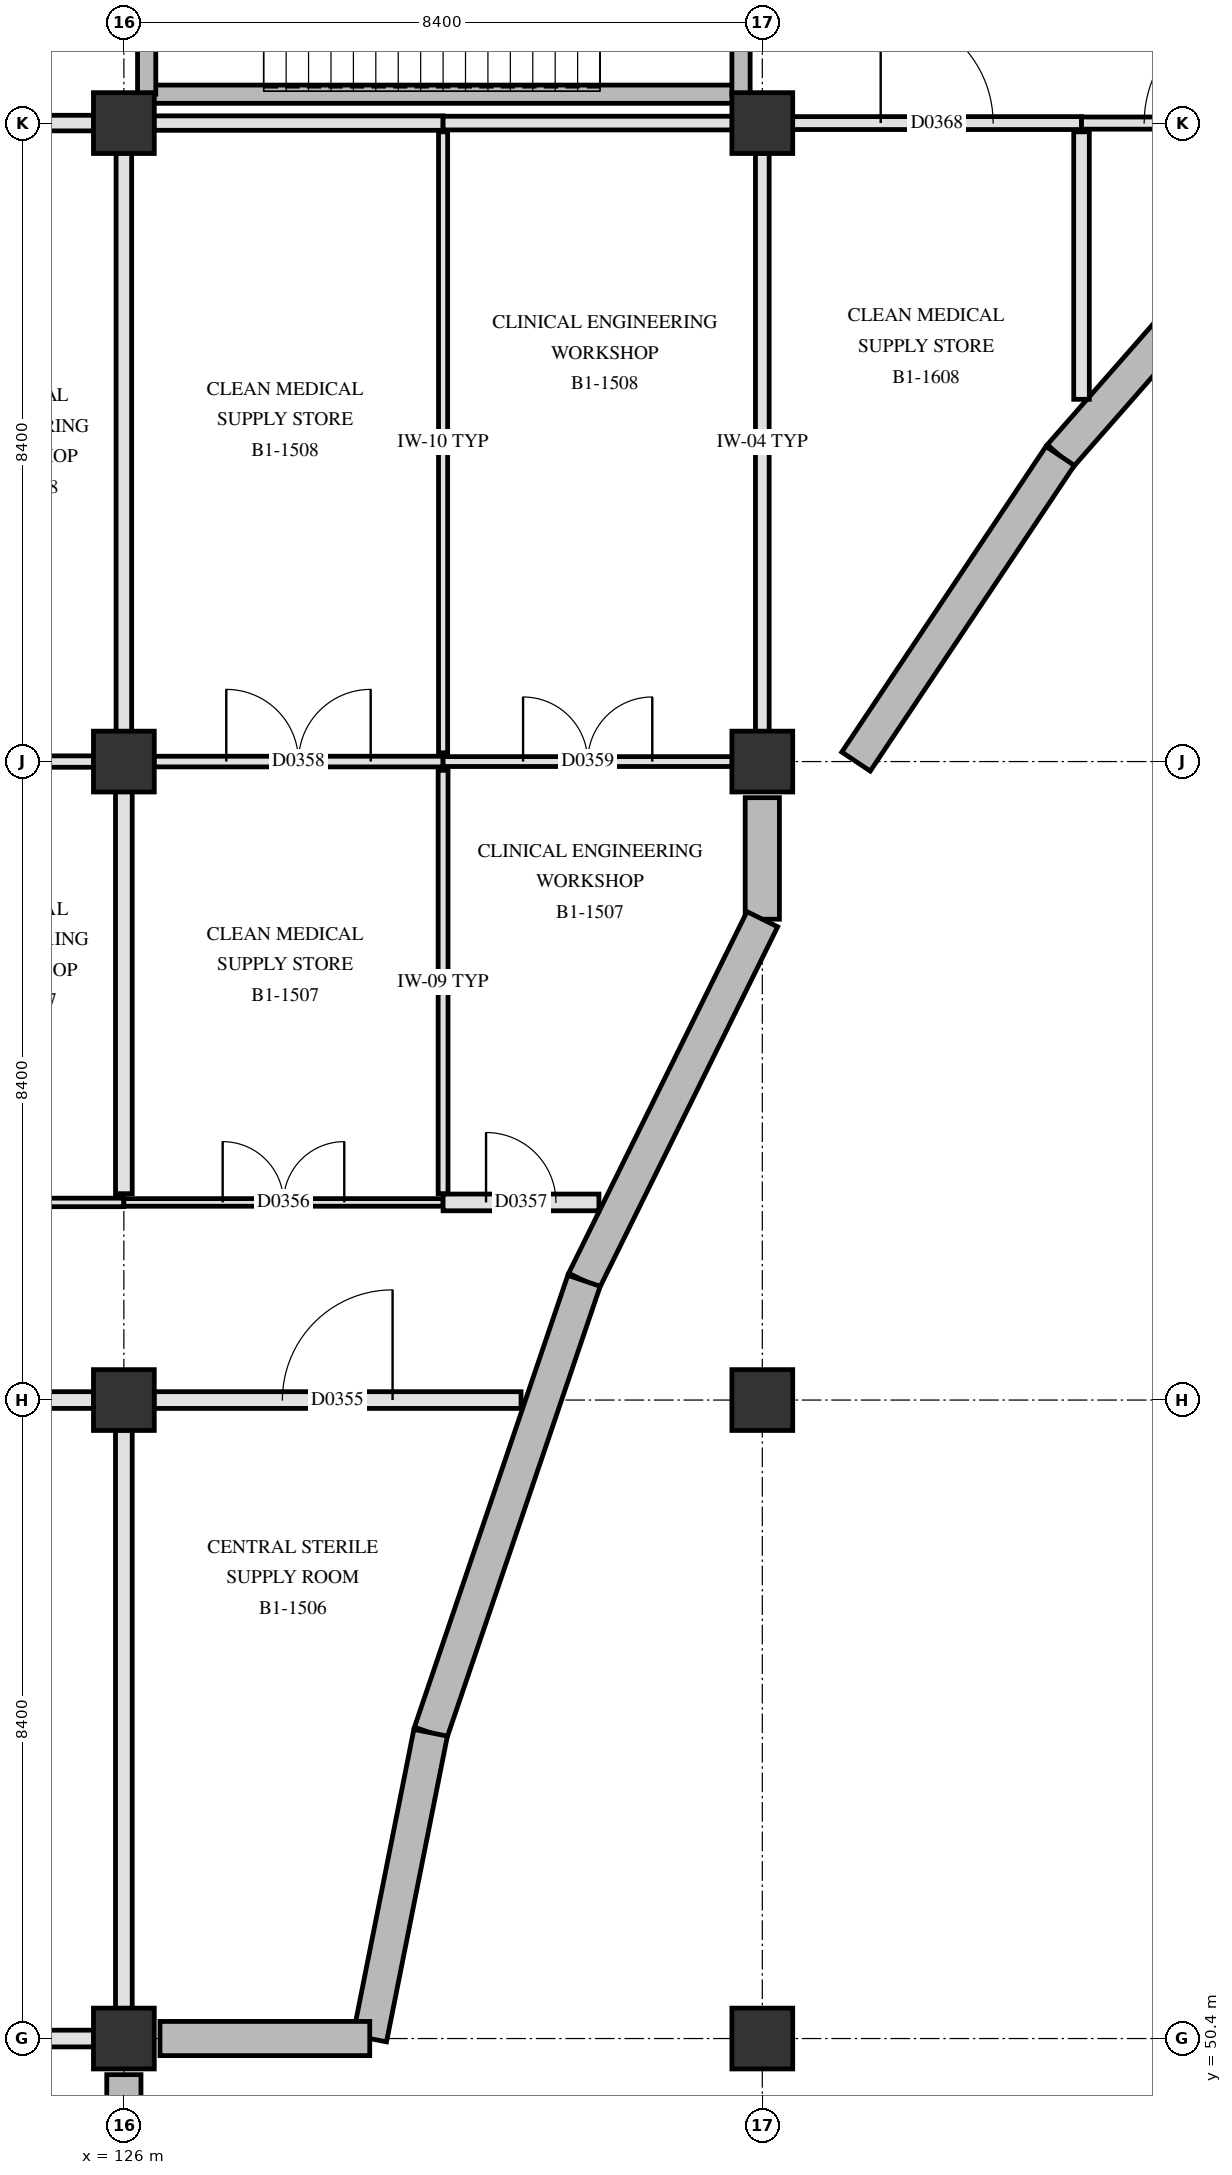
"""IFC4 building model, lengths in metres.
Left out: names, types, materials, properties, quantities, classifications, styles, units other than length and angle.
Written with IfcOpenShell. Run it as: python <this file> out.ifc"""

import sys

from ifc_helpers import new_model, si_unit, direction, frame, frame_2d, origin, origin_2d, place, context, subcontext, project, spatial, rectangle, extrude, element, fill, save


model = new_model("IFC4")
c1 = context("Model", 3, precision=1e-05, world=origin(), true_north=direction((0.0, 1.0)))
c2 = subcontext(c1, "Body", "Model", "MODEL_VIEW")
j1 = project(units=[si_unit("LENGTHUNIT", "METRE"), si_unit("PLANEANGLEUNIT", "RADIAN")], contexts=[c1])
p1 = place(None, origin())
s1 = spatial("IfcSite", under=j1, at=p1, CompositionType="ELEMENT")
p2 = place(p1, origin())
s2 = spatial("IfcBuilding", under=s1, at=p2, CompositionType="ELEMENT")
p3 = place(p2, frame((0.0, 0.0, -5.4)))
s3 = spatial("IfcBuildingStorey", under=s2, at=p3, CompositionType="ELEMENT", Elevation=-5.4)
for number, where, z_axis, x_axis in (
    (1, (126.0, 50.4, 0.0), (0.0, 0.0, 1.0), (1.0, 0.0, 0.0)),
    (2, (126.0, 58.8, 0.0), (0.0, 0.0, 1.0), (1.0, 0.0, 0.0)),
    (3, (126.0, 67.2, 0.0), (0.0, 0.0, 1.0), (1.0, 0.0, 0.0)),
    (4, (126.0, 75.6, 0.0), (0.0, 0.0, 1.0), (1.0, 0.0, 0.0)),
    (5, (134.4, 50.4, 0.0), (0.0, 0.0, 1.0), (1.0, 0.0, 0.0)),
    (6, (134.4, 58.8, 0.0), (0.0, 0.0, 1.0), (1.0, 0.0, 0.0)),
    (7, (134.4, 67.2, 0.0), (0.0, 0.0, 1.0), (1.0, 0.0, 0.0)),
    (8, (134.4, 75.6, 0.0), (0.0, 0.0, 1.0), (1.0, 0.0, 0.0)),
):
    element("IfcColumn", number, at=place(p3, frame(where, z_axis=z_axis, x_axis=x_axis)), inside=s3, PredefinedType="COLUMN", context=c2, shape_type="SweptSolid", body=[
        extrude(rectangle(XDim=0.8, YDim=0.8, at=origin_2d()), origin(), (0.0, 0.0, 1.0), 5.4),
    ])
p4 = place(p3, frame((142.325, 75.788, 0.0), z_axis=(0.0, 0.0, 1.0), x_axis=(-0.659400362996, -0.751791966758, 0.0)))
e9 = element("IfcWall", 9, at=p4, inside=s3, PredefinedType="SOLIDWALL", context=c2, shape_type="SweptSolid", body=[
    extrude(rectangle(XDim=6.075, YDim=0.45, at=frame_2d((3.038, 0.0))), origin(), (0.0, 0.0, 1.0), 5.08),
])
p5 = place(p3, frame((138.319, 71.221, 0.0), z_axis=(0.0, 0.0, 1.0), x_axis=(-0.555468930348, -0.831537291658, 0.0)))
e10 = element("IfcWall", 10, at=p5, inside=s3, PredefinedType="SOLIDWALL", context=c2, shape_type="SweptSolid", body=[
    extrude(rectangle(XDim=4.836, YDim=0.45, at=frame_2d((2.418, 0.0))), origin(), (0.0, 0.0, 1.0), 5.08),
])
p6 = place(p3, frame((134.4, 66.725, 0.0), z_axis=(0.0, 0.0, 1.0), x_axis=(0.0, -1.0, 0.0)))
e11 = element("IfcWall", 11, at=p6, inside=s3, PredefinedType="SOLIDWALL", context=c2, shape_type="SweptSolid", body=[
    extrude(rectangle(XDim=1.599, YDim=0.45, at=frame_2d((0.8, 0.0))), origin(), (0.0, 0.0, 1.0), 5.08),
])
p7 = place(p3, frame((134.4, 65.126, 0.0), z_axis=(0.0, 0.0, 1.0), x_axis=(-0.442290962563, -0.896871620933, 0.0)))
e12 = element("IfcWall", 12, at=p7, inside=s3, PredefinedType="SOLIDWALL", context=c2, shape_type="SweptSolid", body=[
    extrude(rectangle(XDim=5.304, YDim=0.45, at=frame_2d((2.652, 0.0))), origin(), (0.0, 0.0, 1.0), 5.08),
])
p8 = place(p3, frame((132.054, 60.369, 0.0), z_axis=(0.0, 0.0, 1.0), x_axis=(-0.321402193691, -0.946942780685, 0.0)))
e13 = element("IfcWall", 13, at=p8, inside=s3, PredefinedType="SOLIDWALL", context=c2, shape_type="SweptSolid", body=[
    extrude(rectangle(XDim=6.279, YDim=0.45, at=frame_2d((3.14, 0.0))), origin(), (0.0, 0.0, 1.0), 5.08),
])
p9 = place(p3, frame((130.036, 54.423, 0.0), z_axis=(0.0, 0.0, 1.0), x_axis=(-0.195211869209, -0.980761095334, 0.0)))
e14 = element("IfcWall", 14, at=p9, inside=s3, PredefinedType="SOLIDWALL", context=c2, shape_type="SweptSolid", body=[
    extrude(rectangle(XDim=4.102, YDim=0.45, at=frame_2d((2.051, 0.0))), origin(), (0.0, 0.0, 1.0), 5.08),
])
p10 = place(p3, frame((129.235, 50.4, 0.0), z_axis=(0.0, 0.0, 1.0), x_axis=(-1.0, 0.0, 0.0)))
e15 = element("IfcWall", 15, at=p10, inside=s3, PredefinedType="SOLIDWALL", context=c2, shape_type="SweptSolid", body=[
    extrude(rectangle(XDim=2.76, YDim=0.45, at=frame_2d((1.38, 0.0))), origin(), (0.0, 0.0, 1.0), 5.08),
])
p11 = place(p3, frame((126.0, 49.925, 0.0), z_axis=(0.0, 0.0, 1.0), x_axis=(0.0, -1.0, 0.0)))
e16 = element("IfcWall", 16, at=p11, inside=s3, PredefinedType="SOLIDWALL", context=c2, shape_type="SweptSolid", body=[
    extrude(rectangle(XDim=7.45, YDim=0.45, at=frame_2d((3.725, 0.0))), origin(), (0.0, 0.0, 1.0), 5.08),
])
p12 = place(p3, frame((126.3, 75.98, 0.0), z_axis=(0.0, 0.0, 1.0), x_axis=(1.0, 0.0, 0.0)))
e17 = element("IfcWall", 17, at=p12, inside=s3, PredefinedType="SHEAR", context=c2, shape_type="SweptSolid", body=[
    extrude(rectangle(XDim=7.82, YDim=0.24, at=frame_2d((3.91, 0.0))), origin(), (0.0, 0.0, 1.0), 5.08),
])
for number, where, z_axis, x_axis in (
    (18, (126.3, 75.98, 0.0), (0.0, 0.0, 1.0), (0.0, 1.0, 0.0)),
    (19, (134.12, 75.98, 0.0), (0.0, 0.0, 1.0), (0.0, 1.0, 0.0)),
):
    element("IfcWall", number, at=place(p3, frame(where, z_axis=z_axis, x_axis=x_axis)), inside=s3, PredefinedType="SHEAR", context=c2, shape_type="SweptSolid", body=[
        extrude(rectangle(XDim=3.32, YDim=0.24, at=frame_2d((1.66, 0.0))), origin(), (0.0, 0.0, 1.0), 5.08),
    ])
p13 = place(p3, frame((118.045, 50.4, 0.0), z_axis=(0.0, 0.0, 1.0), x_axis=(1.0, 0.0, 0.0)))
e20 = element("IfcWall", 20, at=p13, inside=s3, PredefinedType="PARTITIONING", context=c2, shape_type="SweptSolid", body=[
    extrude(rectangle(XDim=7.56, YDim=0.22, at=frame_2d((3.78, 0.0))), origin(), (0.0, 0.0, 1.0), 4.42),
])
p14 = place(p3, frame((118.045, 58.8, 0.0), z_axis=(0.0, 0.0, 1.0), x_axis=(1.0, 0.0, 0.0)))
e21 = element("IfcWall", 21, at=p14, inside=s3, PredefinedType="PARTITIONING", context=c2, shape_type="SweptSolid", body=[
    extrude(rectangle(XDim=7.56, YDim=0.22, at=frame_2d((3.78, 0.0))), origin(), (0.0, 0.0, 1.0), 4.42),
])
p15 = place(p14, frame((2.86, 0.0, 0.0)))
e22 = element("IfcOpeningElement", 22, at=p15, cuts=e21, PredefinedType="OPENING", context=c2, shape_type="SweptSolid", body=[
    extrude(rectangle(XDim=1.84, YDim=2.28, at=frame_2d((0.92, 1.14))), frame((0.0, 0.12, 0.0), z_axis=(0.0, -1.0, 0.0), x_axis=(1.0, 0.0, 0.0)), (0.0, 0.0, 1.0), 0.24),
])
p16 = place(p3, frame((126.395, 58.8, 0.0), z_axis=(0.0, 0.0, 1.0), x_axis=(1.0, 0.0, 0.0)))
e23 = element("IfcWall", 23, at=p16, inside=s3, PredefinedType="PARTITIONING", context=c2, shape_type="SweptSolid", body=[
    extrude(rectangle(XDim=4.831, YDim=0.22, at=frame_2d((2.416, 0.0))), origin(), (0.0, 0.0, 1.0), 4.42),
])
p17 = place(p16, frame((1.69, 0.0, 0.0)))
e24 = element("IfcOpeningElement", 24, at=p17, cuts=e23, PredefinedType="OPENING", context=c2, shape_type="SweptSolid", body=[
    extrude(rectangle(XDim=1.45, YDim=2.2, at=frame_2d((0.725, 1.1))), frame((0.0, 0.12, 0.0), z_axis=(0.0, -1.0, 0.0), x_axis=(1.0, 0.0, 0.0)), (0.0, 0.0, 1.0), 0.24),
])
p18 = place(p3, frame((121.8, 61.4, 0.0), z_axis=(0.0, 0.0, 1.0), x_axis=(1.0, 0.0, 0.0)))
e25 = element("IfcWall", 25, at=p18, inside=s3, PredefinedType="PARTITIONING", context=c2, shape_type="SweptSolid", body=[
    extrude(rectangle(XDim=4.2, YDim=0.112, at=frame_2d((2.1, 0.0))), origin(), (0.0, 0.0, 1.0), 4.47),
])
p19 = place(p18, frame((1.56, 0.0, 0.0)))
e26 = element("IfcOpeningElement", 26, at=p19, cuts=e25, PredefinedType="OPENING", context=c2, shape_type="SweptSolid", body=[
    extrude(rectangle(XDim=1.08, YDim=2.12, at=frame_2d((0.54, 1.06))), frame((0.0, 0.066, 0.0), z_axis=(0.0, -1.0, 0.0), x_axis=(1.0, 0.0, 0.0)), (0.0, 0.0, 1.0), 0.132),
])
p20 = place(p3, frame((126.0, 61.4, 0.0), z_axis=(0.0, 0.0, 1.0), x_axis=(1.0, 0.0, 0.0)))
e27 = element("IfcWall", 27, at=p20, inside=s3, PredefinedType="PARTITIONING", context=c2, shape_type="SweptSolid", body=[
    extrude(rectangle(XDim=4.2, YDim=0.1, at=frame_2d((2.1, 0.0))), origin(), (0.0, 0.0, 1.0), 4.47),
])
p21 = place(p20, frame((1.3, 0.0, 0.0)))
e28 = element("IfcOpeningElement", 28, at=p21, cuts=e27, PredefinedType="OPENING", context=c2, shape_type="SweptSolid", body=[
    extrude(rectangle(XDim=1.6, YDim=2.25, at=frame_2d((0.8, 1.125))), frame((0.0, 0.06, 0.0), z_axis=(0.0, -1.0, 0.0), x_axis=(1.0, 0.0, 0.0)), (0.0, 0.0, 1.0), 0.12),
])
p22 = place(p3, frame((130.2, 61.4, 0.0), z_axis=(0.0, 0.0, 1.0), x_axis=(1.0, 0.0, 0.0)))
e29 = element("IfcWall", 29, at=p22, inside=s3, PredefinedType="PARTITIONING", context=c2, shape_type="SweptSolid", body=[
    extrude(rectangle(XDim=2.05, YDim=0.22, at=frame_2d((1.025, 0.0))), origin(), (0.0, 0.0, 1.0), 5.07),
])
p23 = place(p22, frame((0.565, 0.0, 0.0)))
e30 = element("IfcOpeningElement", 30, at=p23, cuts=e29, PredefinedType="OPENING", context=c2, shape_type="SweptSolid", body=[
    extrude(rectangle(XDim=0.92, YDim=2.08, at=frame_2d((0.46, 1.04))), frame((0.0, 0.12, 0.0), z_axis=(0.0, -1.0, 0.0), x_axis=(1.0, 0.0, 0.0)), (0.0, 0.0, 1.0), 0.24),
])
p24 = place(p3, frame((121.8, 67.2, 0.0), z_axis=(0.0, 0.0, 1.0), x_axis=(1.0, 0.0, 0.0)))
e31 = element("IfcWall", 31, at=p24, inside=s3, PredefinedType="PARTITIONING", context=c2, shape_type="SweptSolid", body=[
    extrude(rectangle(XDim=3.805, YDim=0.15, at=frame_2d((1.902, 0.0))), origin(), (0.0, 0.0, 1.0), 4.42),
])
p25 = place(p3, frame((126.395, 67.2, 0.0), z_axis=(0.0, 0.0, 1.0), x_axis=(1.0, 0.0, 0.0)))
e32 = element("IfcWall", 32, at=p25, inside=s3, PredefinedType="PARTITIONING", context=c2, shape_type="SweptSolid", body=[
    extrude(rectangle(XDim=3.805, YDim=0.14, at=frame_2d((1.902, 0.0))), origin(), (0.0, 0.0, 1.0), 4.42),
])
p26 = place(p25, frame((0.952, 0.0, 0.0)))
e33 = element("IfcOpeningElement", 33, at=p26, cuts=e32, PredefinedType="OPENING", context=c2, shape_type="SweptSolid", body=[
    extrude(rectangle(XDim=1.9, YDim=2.3, at=frame_2d((0.95, 1.15))), frame((0.0, 0.08, 0.0), z_axis=(0.0, -1.0, 0.0), x_axis=(1.0, 0.0, 0.0)), (0.0, 0.0, 1.0), 0.16),
])
p27 = place(p3, frame((130.2, 67.2, 0.0), z_axis=(0.0, 0.0, 1.0), x_axis=(1.0, 0.0, 0.0)))
e34 = element("IfcWall", 34, at=p27, inside=s3, PredefinedType="PARTITIONING", context=c2, shape_type="SweptSolid", body=[
    extrude(rectangle(XDim=3.805, YDim=0.13, at=frame_2d((1.902, 0.0))), origin(), (0.0, 0.0, 1.0), 4.42),
])
p28 = place(p27, frame((1.052, 0.0, 0.0)))
e35 = element("IfcOpeningElement", 35, at=p28, cuts=e34, PredefinedType="OPENING", context=c2, shape_type="SweptSolid", body=[
    extrude(rectangle(XDim=1.7, YDim=2.25, at=frame_2d((0.85, 1.125))), frame((0.0, 0.075, 0.0), z_axis=(0.0, -1.0, 0.0), x_axis=(1.0, 0.0, 0.0)), (0.0, 0.0, 1.0), 0.15),
])
p29 = place(p3, frame((121.8, 75.6, 0.0), z_axis=(0.0, 0.0, 1.0), x_axis=(1.0, 0.0, 0.0)))
e36 = element("IfcWall", 36, at=p29, inside=s3, PredefinedType="PARTITIONING", context=c2, shape_type="SweptSolid", body=[
    extrude(rectangle(XDim=3.805, YDim=0.205, at=frame_2d((1.902, 0.0))), origin(), (0.0, 0.0, 1.0), 4.42),
])
p30 = place(p29, frame((1.242, 0.0, 0.0)))
e37 = element("IfcOpeningElement", 37, at=p30, cuts=e36, PredefinedType="OPENING", context=c2, shape_type="SweptSolid", body=[
    extrude(rectangle(XDim=1.32, YDim=2.18, at=frame_2d((0.66, 1.09))), frame((0.0, 0.113, 0.0), z_axis=(0.0, -1.0, 0.0), x_axis=(1.0, 0.0, 0.0)), (0.0, 0.0, 1.0), 0.225),
])
p31 = place(p3, frame((126.395, 75.6, 0.0), z_axis=(0.0, 0.0, 1.0), x_axis=(1.0, 0.0, 0.0)))
e38 = element("IfcWall", 38, at=p31, inside=s3, PredefinedType="PARTITIONING", context=c2, shape_type="SweptSolid", body=[
    extrude(rectangle(XDim=3.805, YDim=0.19, at=frame_2d((1.902, 0.0))), origin(), (0.0, 0.0, 1.0), 4.42),
])
p32 = place(p3, frame((130.2, 75.6, 0.0), z_axis=(0.0, 0.0, 1.0), x_axis=(1.0, 0.0, 0.0)))
e39 = element("IfcWall", 39, at=p32, inside=s3, PredefinedType="PARTITIONING", context=c2, shape_type="SweptSolid", body=[
    extrude(rectangle(XDim=3.805, YDim=0.18, at=frame_2d((1.902, 0.0))), origin(), (0.0, 0.0, 1.0), 4.42),
])
p33 = place(p3, frame((134.795, 75.6, 0.0), z_axis=(0.0, 0.0, 1.0), x_axis=(1.0, 0.0, 0.0)))
e40 = element("IfcWall", 40, at=p33, inside=s3, PredefinedType="PARTITIONING", context=c2, shape_type="SweptSolid", body=[
    extrude(rectangle(XDim=3.805, YDim=0.17, at=frame_2d((1.903, 0.0))), origin(), (0.0, 0.0, 1.0), 4.42),
])
p34 = place(p33, frame((1.163, 0.0, 0.0)))
e41 = element("IfcOpeningElement", 41, at=p34, cuts=e40, PredefinedType="OPENING", context=c2, shape_type="SweptSolid", body=[
    extrude(rectangle(XDim=1.48, YDim=2.22, at=frame_2d((0.74, 1.11))), frame((0.0, 0.095, 0.0), z_axis=(0.0, -1.0, 0.0), x_axis=(1.0, 0.0, 0.0)), (0.0, 0.0, 1.0), 0.19),
])
p35 = place(p3, frame((138.6, 75.6, 0.0), z_axis=(0.0, 0.0, 1.0), x_axis=(1.0, 0.0, 0.0)))
e42 = element("IfcWall", 42, at=p35, inside=s3, PredefinedType="PARTITIONING", context=c2, shape_type="SweptSolid", body=[
    extrude(rectangle(XDim=3.188, YDim=0.16, at=frame_2d((1.594, 0.0))), origin(), (0.0, 0.0, 1.0), 4.42),
])
p36 = place(p35, frame((0.824, 0.0, 0.0)))
e43 = element("IfcOpeningElement", 43, at=p36, cuts=e42, PredefinedType="OPENING", context=c2, shape_type="SweptSolid", body=[
    extrude(rectangle(XDim=1.54, YDim=2.24, at=frame_2d((0.77, 1.12))), frame((0.0, 0.09, 0.0), z_axis=(0.0, -1.0, 0.0), x_axis=(1.0, 0.0, 0.0)), (0.0, 0.0, 1.0), 0.18),
])
p37 = place(p3, frame((126.0, 50.795, 0.0), z_axis=(0.0, 0.0, 1.0), x_axis=(0.0, 1.0, 0.0)))
e44 = element("IfcWall", 44, at=p37, inside=s3, PredefinedType="PARTITIONING", context=c2, shape_type="SweptSolid", body=[
    extrude(rectangle(XDim=7.61, YDim=0.22, at=frame_2d((3.805, 0.0))), origin(), (0.0, 0.0, 1.0), 4.47),
])
p38 = place(p3, frame((126.0, 61.515, 0.0), z_axis=(0.0, 0.0, 1.0), x_axis=(0.0, 1.0, 0.0)))
e45 = element("IfcWall", 45, at=p38, inside=s3, PredefinedType="PARTITIONING", context=c2, shape_type="SweptSolid", body=[
    extrude(rectangle(XDim=5.29, YDim=0.22, at=frame_2d((2.645, 0.0))), origin(), (0.0, 0.0, 1.0), 4.47),
])
p39 = place(p3, frame((126.0, 67.595, 0.0), z_axis=(0.0, 0.0, 1.0), x_axis=(0.0, 1.0, 0.0)))
e46 = element("IfcWall", 46, at=p39, inside=s3, PredefinedType="PARTITIONING", context=c2, shape_type="SweptSolid", body=[
    extrude(rectangle(XDim=7.61, YDim=0.205, at=frame_2d((3.805, 0.0))), origin(), (0.0, 0.0, 1.0), 4.47),
])
p40 = place(p3, frame((130.2, 61.515, 0.0), z_axis=(0.0, 0.0, 1.0), x_axis=(0.0, 1.0, 0.0)))
e47 = element("IfcWall", 47, at=p40, inside=s3, PredefinedType="PARTITIONING", context=c2, shape_type="SweptSolid", body=[
    extrude(rectangle(XDim=5.57, YDim=0.13, at=frame_2d((2.785, 0.0))), origin(), (0.0, 0.0, 1.0), 4.42),
])
p41 = place(p3, frame((130.2, 67.315, 0.0), z_axis=(0.0, 0.0, 1.0), x_axis=(0.0, 1.0, 0.0)))
e48 = element("IfcWall", 48, at=p41, inside=s3, PredefinedType="PARTITIONING", context=c2, shape_type="SweptSolid", body=[
    extrude(rectangle(XDim=8.17, YDim=0.12, at=frame_2d((4.085, 0.0))), origin(), (0.0, 0.0, 1.0), 4.42),
])
p42 = place(p3, frame((134.4, 67.595, 0.0), z_axis=(0.0, 0.0, 1.0), x_axis=(0.0, 1.0, 0.0)))
e49 = element("IfcWall", 49, at=p42, inside=s3, PredefinedType="PARTITIONING", context=c2, shape_type="SweptSolid", body=[
    extrude(rectangle(XDim=7.61, YDim=0.18, at=frame_2d((3.805, 0.0))), origin(), (0.0, 0.0, 1.0), 4.47),
])
p43 = place(p3, frame((138.6, 71.966, 0.0), z_axis=(0.0, 0.0, 1.0), x_axis=(0.0, 1.0, 0.0)))
e50 = element("IfcWall", 50, at=p43, inside=s3, PredefinedType="PARTITIONING", context=c2, shape_type="SweptSolid", body=[
    extrude(rectangle(XDim=3.519, YDim=0.205, at=frame_2d((1.76, 0.0))), origin(), (0.0, 0.0, 1.0), 4.42),
])
p44 = place(p17, origin())
e51 = element("IfcDoor", 51, at=p44, inside=s3, OperationType="SINGLE_SWING_RIGHT", PredefinedType="DOOR", context=c2, shape_type="SweptSolid", body=[
    extrude(rectangle(XDim=1.45, YDim=2.2, at=frame_2d((0.725, 1.1))), frame((0.0, 0.025, 0.0), z_axis=(0.0, -1.0, 0.0), x_axis=(1.0, 0.0, 0.0)), (0.0, 0.0, 1.0), 0.05),
])
fill(e24, e51)
p45 = place(p21, origin())
e52 = element("IfcDoor", 52, at=p45, inside=s3, OperationType="DOUBLE_SWING_LEFT", PredefinedType="DOOR", context=c2, shape_type="SweptSolid", body=[
    extrude(rectangle(XDim=1.6, YDim=2.25, at=frame_2d((0.8, 1.125))), frame((0.0, 0.025, 0.0), z_axis=(0.0, -1.0, 0.0), x_axis=(1.0, 0.0, 0.0)), (0.0, 0.0, 1.0), 0.05),
])
fill(e28, e52)
p46 = place(p23, origin())
e53 = element("IfcDoor", 53, at=p46, inside=s3, OperationType="SINGLE_SWING_LEFT", PredefinedType="DOOR", context=c2, shape_type="SweptSolid", body=[
    extrude(rectangle(XDim=0.92, YDim=2.08, at=frame_2d((0.46, 1.04))), frame((0.0, 0.025, 0.0), z_axis=(0.0, -1.0, 0.0), x_axis=(1.0, 0.0, 0.0)), (0.0, 0.0, 1.0), 0.05),
])
fill(e30, e53)
p47 = place(p26, origin())
e54 = element("IfcDoor", 54, at=p47, inside=s3, OperationType="DOUBLE_SWING_LEFT", PredefinedType="DOOR", context=c2, shape_type="SweptSolid", body=[
    extrude(rectangle(XDim=1.9, YDim=2.3, at=frame_2d((0.95, 1.15))), frame((0.0, 0.025, 0.0), z_axis=(0.0, -1.0, 0.0), x_axis=(1.0, 0.0, 0.0)), (0.0, 0.0, 1.0), 0.05),
])
fill(e33, e54)
p48 = place(p28, origin())
e55 = element("IfcDoor", 55, at=p48, inside=s3, OperationType="DOUBLE_SWING_RIGHT", PredefinedType="DOOR", context=c2, shape_type="SweptSolid", body=[
    extrude(rectangle(XDim=1.7, YDim=2.25, at=frame_2d((0.85, 1.125))), frame((0.0, 0.025, 0.0), z_axis=(0.0, -1.0, 0.0), x_axis=(1.0, 0.0, 0.0)), (0.0, 0.0, 1.0), 0.05),
])
fill(e35, e55)
p49 = place(p34, origin())
e56 = element("IfcDoor", 56, at=p49, inside=s3, OperationType="SINGLE_SWING_LEFT", PredefinedType="DOOR", context=c2, shape_type="SweptSolid", body=[
    extrude(rectangle(XDim=1.48, YDim=2.22, at=frame_2d((0.74, 1.11))), frame((0.0, 0.025, 0.0), z_axis=(0.0, -1.0, 0.0), x_axis=(1.0, 0.0, 0.0)), (0.0, 0.0, 1.0), 0.05),
])
fill(e41, e56)
p50 = place(p36, origin())
e57 = element("IfcDoor", 57, at=p50, inside=s3, OperationType="SINGLE_SWING_RIGHT", PredefinedType="DOOR", context=c2, shape_type="SweptSolid", body=[
    extrude(rectangle(XDim=1.54, YDim=2.24, at=frame_2d((0.77, 1.12))), frame((0.0, 0.025, 0.0), z_axis=(0.0, -1.0, 0.0), x_axis=(1.0, 0.0, 0.0)), (0.0, 0.0, 1.0), 0.05),
])
fill(e43, e57)
save(model, sys.argv[1])
